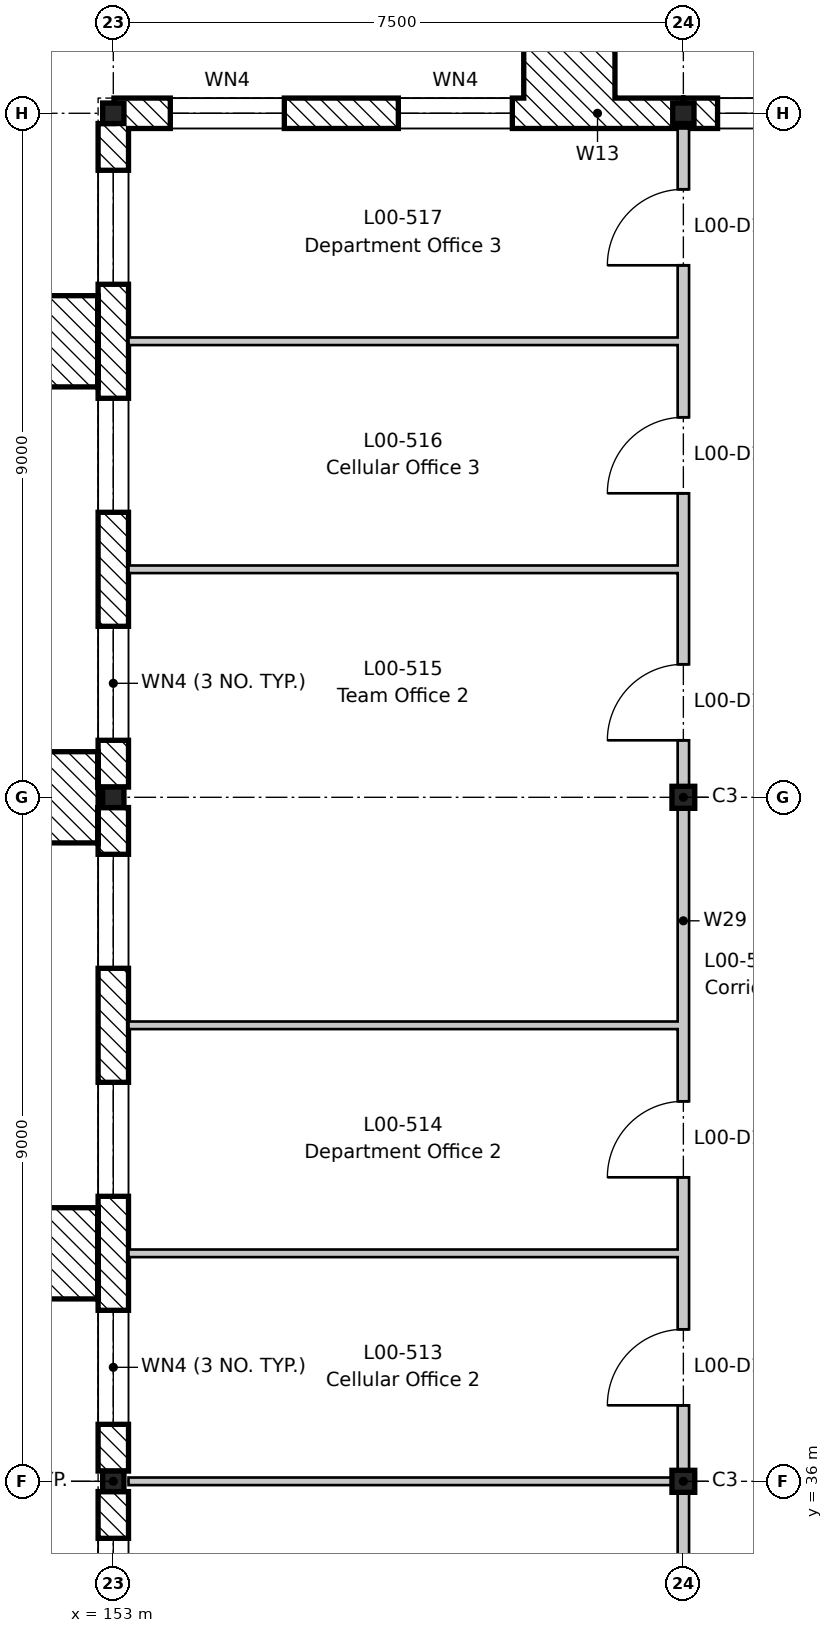
"""IFC4 building model, lengths in metres.
Left out: names, types, materials, properties, quantities, classifications, styles, units other than length and angle.
Written with IfcOpenShell. Run it as: python <this file> out.ifc"""

import sys

from ifc_helpers import new_model, si_unit, direction, frame, frame_2d, origin, origin_2d, place, context, subcontext, project, spatial, rectangle, i_section, extrude, element, fill, save


model = new_model("IFC4")
c1 = context("Model", 3, precision=1e-05, world=origin(), true_north=direction((0.0, 1.0)))
c2 = subcontext(c1, "Body", "Model", "MODEL_VIEW")
j1 = project(units=[si_unit("LENGTHUNIT", "METRE"), si_unit("PLANEANGLEUNIT", "RADIAN")], contexts=[c1])
p1 = place(None, origin())
s1 = spatial("IfcSite", under=j1, at=p1, CompositionType="ELEMENT")
p2 = place(p1, origin())
s2 = spatial("IfcBuilding", under=s1, at=p2, CompositionType="ELEMENT")
p3 = place(p2, origin())
s3 = spatial("IfcBuildingStorey", under=s2, at=p3, CompositionType="ELEMENT", Elevation=0.0)
for number, where, z_axis, x_axis in (
    (1, (153.0, 36.0, -0.6), (0.0, 0.0, 1.0), (1.0, 0.0, 0.0)),
    (2, (153.0, 45.0, -0.6), (0.0, 0.0, 1.0), (1.0, 0.0, 0.0)),
    (3, (153.0, 54.0, -0.6), (0.0, 0.0, 1.0), (1.0, 0.0, 0.0)),
):
    element("IfcColumn", number, at=place(p3, frame(where, z_axis=z_axis, x_axis=x_axis)), inside=s3, PredefinedType="COLUMN", context=c2, shape_type="SweptSolid", body=[
        extrude(i_section(OverallWidth=0.28, OverallDepth=0.27, WebThickness=0.008, FlangeThickness=0.013, FilletRadius=0.024, at=origin_2d()), origin(), (0.0, 0.0, 1.0), 5.8),
    ])
for number, where, z_axis, x_axis in (
    (4, (160.5, 36.0, -0.6), (0.0, 0.0, 1.0), (1.0, 0.0, 0.0)),
    (5, (160.5, 45.0, -0.6), (0.0, 0.0, 1.0), (1.0, 0.0, 0.0)),
):
    element("IfcColumn", number, at=place(p3, frame(where, z_axis=z_axis, x_axis=x_axis)), inside=s3, PredefinedType="COLUMN", context=c2, shape_type="SweptSolid", body=[
        extrude(i_section(OverallWidth=0.3, OverallDepth=0.29, WebThickness=0.009, FlangeThickness=0.014, FilletRadius=0.027, at=origin_2d()), origin(), (0.0, 0.0, 1.0), 5.8),
    ])
p4 = place(p3, frame((160.5, 54.0, -0.6), z_axis=(0.0, 0.0, 1.0), x_axis=(1.0, 0.0, 0.0)))
e6 = element("IfcColumn", 6, at=p4, inside=s3, PredefinedType="COLUMN", context=c2, shape_type="SweptSolid", body=[
    extrude(i_section(OverallWidth=0.28, OverallDepth=0.27, WebThickness=0.008, FlangeThickness=0.013, FilletRadius=0.024, at=origin_2d()), origin(), (0.0, 0.0, 1.0), 5.8),
])
p5 = place(p3, frame((153.0, 27.135, 0.0), z_axis=(0.0, 0.0, 1.0), x_axis=(0.0, 1.0, 0.0)))
e7 = element("IfcWall", 7, at=p5, inside=s3, PredefinedType="STANDARD", context=c2, shape_type="SweptSolid", body=[
    extrude(rectangle(XDim=8.73, YDim=0.4, at=frame_2d((4.365, 0.0))), origin(), (0.0, 0.0, 1.0), 4.8),
])
p6 = place(p5, frame((0.615, 0.0, 0.3)))
e8 = element("IfcOpeningElement", 8, at=p6, cuts=e7, PredefinedType="OPENING", context=c2, shape_type="SweptSolid", body=[
    extrude(rectangle(XDim=1.5, YDim=3.3, at=frame_2d((0.75, 1.65))), frame((0.0, 0.21, 0.0), z_axis=(0.0, -1.0, 0.0), x_axis=(1.0, 0.0, 0.0)), (0.0, 0.0, 1.0), 0.42),
])
p7 = place(p5, frame((3.615, 0.0, 0.3)))
e9 = element("IfcOpeningElement", 9, at=p7, cuts=e7, PredefinedType="OPENING", context=c2, shape_type="SweptSolid", body=[
    extrude(rectangle(XDim=1.5, YDim=3.3, at=frame_2d((0.75, 1.65))), frame((0.0, 0.21, 0.0), z_axis=(0.0, -1.0, 0.0), x_axis=(1.0, 0.0, 0.0)), (0.0, 0.0, 1.0), 0.42),
])
p8 = place(p5, frame((6.615, 0.0, 0.3)))
e10 = element("IfcOpeningElement", 10, at=p8, cuts=e7, PredefinedType="OPENING", context=c2, shape_type="SweptSolid", body=[
    extrude(rectangle(XDim=1.5, YDim=3.3, at=frame_2d((0.75, 1.65))), frame((0.0, 0.21, 0.0), z_axis=(0.0, -1.0, 0.0), x_axis=(1.0, 0.0, 0.0)), (0.0, 0.0, 1.0), 0.42),
])
p9 = place(p3, frame((153.0, 36.135, 0.0), z_axis=(0.0, 0.0, 1.0), x_axis=(0.0, 1.0, 0.0)))
e11 = element("IfcWall", 11, at=p9, inside=s3, PredefinedType="STANDARD", context=c2, shape_type="SweptSolid", body=[
    extrude(rectangle(XDim=8.73, YDim=0.4, at=frame_2d((4.365, 0.0))), origin(), (0.0, 0.0, 1.0), 4.8),
])
p10 = place(p9, frame((0.615, 0.0, 0.3)))
e12 = element("IfcOpeningElement", 12, at=p10, cuts=e11, PredefinedType="OPENING", context=c2, shape_type="SweptSolid", body=[
    extrude(rectangle(XDim=1.5, YDim=3.3, at=frame_2d((0.75, 1.65))), frame((0.0, 0.21, 0.0), z_axis=(0.0, -1.0, 0.0), x_axis=(1.0, 0.0, 0.0)), (0.0, 0.0, 1.0), 0.42),
])
p11 = place(p9, frame((3.615, 0.0, 0.3)))
e13 = element("IfcOpeningElement", 13, at=p11, cuts=e11, PredefinedType="OPENING", context=c2, shape_type="SweptSolid", body=[
    extrude(rectangle(XDim=1.5, YDim=3.3, at=frame_2d((0.75, 1.65))), frame((0.0, 0.21, 0.0), z_axis=(0.0, -1.0, 0.0), x_axis=(1.0, 0.0, 0.0)), (0.0, 0.0, 1.0), 0.42),
])
p12 = place(p9, frame((6.615, 0.0, 0.3)))
e14 = element("IfcOpeningElement", 14, at=p12, cuts=e11, PredefinedType="OPENING", context=c2, shape_type="SweptSolid", body=[
    extrude(rectangle(XDim=1.5, YDim=3.3, at=frame_2d((0.75, 1.65))), frame((0.0, 0.21, 0.0), z_axis=(0.0, -1.0, 0.0), x_axis=(1.0, 0.0, 0.0)), (0.0, 0.0, 1.0), 0.42),
])
p13 = place(p3, frame((153.0, 45.135, 0.0), z_axis=(0.0, 0.0, 1.0), x_axis=(0.0, 1.0, 0.0)))
e15 = element("IfcWall", 15, at=p13, inside=s3, PredefinedType="STANDARD", context=c2, shape_type="SweptSolid", body=[
    extrude(rectangle(XDim=8.73, YDim=0.4, at=frame_2d((4.365, 0.0))), origin(), (0.0, 0.0, 1.0), 4.8),
])
p14 = place(p13, frame((0.615, 0.0, 0.3)))
e16 = element("IfcOpeningElement", 16, at=p14, cuts=e15, PredefinedType="OPENING", context=c2, shape_type="SweptSolid", body=[
    extrude(rectangle(XDim=1.5, YDim=3.3, at=frame_2d((0.75, 1.65))), frame((0.0, 0.21, 0.0), z_axis=(0.0, -1.0, 0.0), x_axis=(1.0, 0.0, 0.0)), (0.0, 0.0, 1.0), 0.42),
])
p15 = place(p13, frame((3.615, 0.0, 0.3)))
e17 = element("IfcOpeningElement", 17, at=p15, cuts=e15, PredefinedType="OPENING", context=c2, shape_type="SweptSolid", body=[
    extrude(rectangle(XDim=1.5, YDim=3.3, at=frame_2d((0.75, 1.65))), frame((0.0, 0.21, 0.0), z_axis=(0.0, -1.0, 0.0), x_axis=(1.0, 0.0, 0.0)), (0.0, 0.0, 1.0), 0.42),
])
p16 = place(p13, frame((6.615, 0.0, 0.3)))
e18 = element("IfcOpeningElement", 18, at=p16, cuts=e15, PredefinedType="OPENING", context=c2, shape_type="SweptSolid", body=[
    extrude(rectangle(XDim=1.5, YDim=3.3, at=frame_2d((0.75, 1.65))), frame((0.0, 0.21, 0.0), z_axis=(0.0, -1.0, 0.0), x_axis=(1.0, 0.0, 0.0)), (0.0, 0.0, 1.0), 0.42),
])
p17 = place(p3, frame((153.009, 54.0, 0.0), z_axis=(0.0, 0.0, 1.0), x_axis=(1.0, 0.0, 0.0)))
e19 = element("IfcWall", 19, at=p17, inside=s3, PredefinedType="STANDARD", context=c2, shape_type="SweptSolid", body=[
    extrude(rectangle(XDim=7.482, YDim=0.4, at=frame_2d((3.741, 0.0))), origin(), (0.0, 0.0, 1.0), 4.87),
])
p18 = place(p17, frame((0.741, 0.0, 0.3)))
e20 = element("IfcOpeningElement", 20, at=p18, cuts=e19, PredefinedType="OPENING", context=c2, shape_type="SweptSolid", body=[
    extrude(rectangle(XDim=1.5, YDim=3.3, at=frame_2d((0.75, 1.65))), frame((0.0, 0.21, 0.0), z_axis=(0.0, -1.0, 0.0), x_axis=(1.0, 0.0, 0.0)), (0.0, 0.0, 1.0), 0.42),
])
p19 = place(p17, frame((3.741, 0.0, 0.3)))
e21 = element("IfcOpeningElement", 21, at=p19, cuts=e19, PredefinedType="OPENING", context=c2, shape_type="SweptSolid", body=[
    extrude(rectangle(XDim=1.5, YDim=3.3, at=frame_2d((0.75, 1.65))), frame((0.0, 0.21, 0.0), z_axis=(0.0, -1.0, 0.0), x_axis=(1.0, 0.0, 0.0)), (0.0, 0.0, 1.0), 0.42),
])
p20 = place(p3, frame((160.509, 54.0, 0.0), z_axis=(0.0, 0.0, 1.0), x_axis=(1.0, 0.0, 0.0)))
e22 = element("IfcWall", 22, at=p20, inside=s3, PredefinedType="STANDARD", context=c2, shape_type="SweptSolid", body=[
    extrude(rectangle(XDim=2.982, YDim=0.4, at=frame_2d((1.491, 0.0))), origin(), (0.0, 0.0, 1.0), 5.0),
])
p21 = place(p20, frame((0.441, 0.0, 0.9)))
e23 = element("IfcOpeningElement", 23, at=p21, cuts=e22, PredefinedType="OPENING", context=c2, shape_type="SweptSolid", body=[
    extrude(rectangle(XDim=2.1, YDim=2.1, at=frame_2d((1.05, 1.05))), frame((0.0, 0.21, 0.0), z_axis=(0.0, -1.0, 0.0), x_axis=(1.0, 0.0, 0.0)), (0.0, 0.0, 1.0), 0.42),
])
for number, where, z_axis, x_axis in (
    (24, (152.2, 38.4, 0.0), (0.0, 0.0, 1.0), (0.0, 1.0, 0.0)),
    (25, (152.2, 44.4, 0.0), (0.0, 0.0, 1.0), (0.0, 1.0, 0.0)),
    (26, (152.2, 50.4, 0.0), (0.0, 0.0, 1.0), (0.0, 1.0, 0.0)),
    (27, (158.4, 54.8, 0.0), (0.0, 0.0, 1.0), (1.0, 0.0, 0.0)),
):
    element("IfcWall", number, at=place(p3, frame(where, z_axis=z_axis, x_axis=x_axis)), inside=s3, PredefinedType="STANDARD", context=c2, shape_type="SweptSolid", body=[
        extrude(rectangle(XDim=1.2, YDim=1.2, at=frame_2d((0.6, 0.0))), origin(), (0.0, 0.0, 1.0), 5.4),
    ])
p22 = place(p3, frame((153.2, 36.0, 0.0), z_axis=(0.0, 0.0, 1.0), x_axis=(1.0, 0.0, 0.0)))
e28 = element("IfcWall", 28, at=p22, inside=s3, PredefinedType="PARTITIONING", context=c2, shape_type="SweptSolid", body=[
    extrude(rectangle(XDim=7.225, YDim=0.1, at=frame_2d((3.613, 0.0))), origin(), (0.0, 0.0, 1.0), 4.85),
])
for number, where, z_axis, x_axis in (
    (29, (153.2, 39.0, 0.0), (0.0, 0.0, 1.0), (1.0, 0.0, 0.0)),
    (30, (153.2, 42.0, 0.0), (0.0, 0.0, 1.0), (1.0, 0.0, 0.0)),
    (31, (153.2, 48.0, 0.0), (0.0, 0.0, 1.0), (1.0, 0.0, 0.0)),
    (32, (153.2, 51.0, 0.0), (0.0, 0.0, 1.0), (1.0, 0.0, 0.0)),
):
    element("IfcWall", number, at=place(p3, frame(where, z_axis=z_axis, x_axis=x_axis)), inside=s3, PredefinedType="PARTITIONING", context=c2, shape_type="SweptSolid", body=[
        extrude(rectangle(XDim=7.225, YDim=0.1, at=frame_2d((3.613, 0.0))), origin(), (0.0, 0.0, 1.0), 5.2),
    ])
p23 = place(p3, frame((160.5, 0.0, 0.0), z_axis=(0.0, 0.0, 1.0), x_axis=(0.0, 1.0, 0.0)))
e33 = element("IfcWall", 33, at=p23, inside=s3, PredefinedType="PARTITIONING", context=c2, shape_type="SweptSolid", body=[
    extrude(rectangle(XDim=53.8, YDim=0.15, at=frame_2d((26.9, 0.0))), origin(), (0.0, 0.0, 1.0), 4.68),
])
p24 = place(p23, frame((2.5, 0.0, 0.0)))
e34 = element("IfcOpeningElement", 34, at=p24, cuts=e33, PredefinedType="OPENING", context=c2, shape_type="SweptSolid", body=[
    extrude(rectangle(XDim=1.0, YDim=2.1, at=frame_2d((0.5, 1.05))), frame((0.0, 0.085, 0.0), z_axis=(0.0, -1.0, 0.0), x_axis=(1.0, 0.0, 0.0)), (0.0, 0.0, 1.0), 0.17),
])
p25 = place(p23, frame((9.75, 0.0, 0.0)))
e35 = element("IfcOpeningElement", 35, at=p25, cuts=e33, PredefinedType="OPENING", context=c2, shape_type="SweptSolid", body=[
    extrude(rectangle(XDim=1.0, YDim=2.1, at=frame_2d((0.5, 1.05))), frame((0.0, 0.085, 0.0), z_axis=(0.0, -1.0, 0.0), x_axis=(1.0, 0.0, 0.0)), (0.0, 0.0, 1.0), 0.17),
])
p26 = place(p23, frame((14.5, 0.0, 0.0)))
e36 = element("IfcOpeningElement", 36, at=p26, cuts=e33, PredefinedType="OPENING", context=c2, shape_type="SweptSolid", body=[
    extrude(rectangle(XDim=1.0, YDim=2.1, at=frame_2d((0.5, 1.05))), frame((0.0, 0.085, 0.0), z_axis=(0.0, -1.0, 0.0), x_axis=(1.0, 0.0, 0.0)), (0.0, 0.0, 1.0), 0.17),
])
p27 = place(p23, frame((19.0, 0.0, 0.0)))
e37 = element("IfcOpeningElement", 37, at=p27, cuts=e33, PredefinedType="OPENING", context=c2, shape_type="SweptSolid", body=[
    extrude(rectangle(XDim=1.0, YDim=2.1, at=frame_2d((0.5, 1.05))), frame((0.0, 0.085, 0.0), z_axis=(0.0, -1.0, 0.0), x_axis=(1.0, 0.0, 0.0)), (0.0, 0.0, 1.0), 0.17),
])
p28 = place(p23, frame((24.8, 0.0, 0.0)))
e38 = element("IfcOpeningElement", 38, at=p28, cuts=e33, PredefinedType="OPENING", context=c2, shape_type="SweptSolid", body=[
    extrude(rectangle(XDim=1.4, YDim=2.1, at=frame_2d((0.7, 1.05))), frame((0.0, 0.085, 0.0), z_axis=(0.0, -1.0, 0.0), x_axis=(1.0, 0.0, 0.0)), (0.0, 0.0, 1.0), 0.17),
])
p29 = place(p23, frame((32.5, 0.0, 0.0)))
e39 = element("IfcOpeningElement", 39, at=p29, cuts=e33, PredefinedType="OPENING", context=c2, shape_type="SweptSolid", body=[
    extrude(rectangle(XDim=1.0, YDim=2.1, at=frame_2d((0.5, 1.05))), frame((0.0, 0.085, 0.0), z_axis=(0.0, -1.0, 0.0), x_axis=(1.0, 0.0, 0.0)), (0.0, 0.0, 1.0), 0.17),
])
p30 = place(p23, frame((37.0, 0.0, 0.0)))
e40 = element("IfcOpeningElement", 40, at=p30, cuts=e33, PredefinedType="OPENING", context=c2, shape_type="SweptSolid", body=[
    extrude(rectangle(XDim=1.0, YDim=2.1, at=frame_2d((0.5, 1.05))), frame((0.0, 0.085, 0.0), z_axis=(0.0, -1.0, 0.0), x_axis=(1.0, 0.0, 0.0)), (0.0, 0.0, 1.0), 0.17),
])
p31 = place(p23, frame((40.0, 0.0, 0.0)))
e41 = element("IfcOpeningElement", 41, at=p31, cuts=e33, PredefinedType="OPENING", context=c2, shape_type="SweptSolid", body=[
    extrude(rectangle(XDim=1.0, YDim=2.1, at=frame_2d((0.5, 1.05))), frame((0.0, 0.085, 0.0), z_axis=(0.0, -1.0, 0.0), x_axis=(1.0, 0.0, 0.0)), (0.0, 0.0, 1.0), 0.17),
])
p32 = place(p23, frame((45.75, 0.0, 0.0)))
e42 = element("IfcOpeningElement", 42, at=p32, cuts=e33, PredefinedType="OPENING", context=c2, shape_type="SweptSolid", body=[
    extrude(rectangle(XDim=1.0, YDim=2.1, at=frame_2d((0.5, 1.05))), frame((0.0, 0.085, 0.0), z_axis=(0.0, -1.0, 0.0), x_axis=(1.0, 0.0, 0.0)), (0.0, 0.0, 1.0), 0.17),
])
p33 = place(p23, frame((49.0, 0.0, 0.0)))
e43 = element("IfcOpeningElement", 43, at=p33, cuts=e33, PredefinedType="OPENING", context=c2, shape_type="SweptSolid", body=[
    extrude(rectangle(XDim=1.0, YDim=2.1, at=frame_2d((0.5, 1.05))), frame((0.0, 0.085, 0.0), z_axis=(0.0, -1.0, 0.0), x_axis=(1.0, 0.0, 0.0)), (0.0, 0.0, 1.0), 0.17),
])
p34 = place(p23, frame((52.0, 0.0, 0.0)))
e44 = element("IfcOpeningElement", 44, at=p34, cuts=e33, PredefinedType="OPENING", context=c2, shape_type="SweptSolid", body=[
    extrude(rectangle(XDim=1.0, YDim=2.1, at=frame_2d((0.5, 1.05))), frame((0.0, 0.085, 0.0), z_axis=(0.0, -1.0, 0.0), x_axis=(1.0, 0.0, 0.0)), (0.0, 0.0, 1.0), 0.17),
])
p35 = place(p8, origin())
e45 = element("IfcWindow", 45, at=p35, inside=s3, PartitioningType="SINGLE_PANEL", PredefinedType="WINDOW", context=c2, shape_type="SweptSolid", body=[
    extrude(rectangle(XDim=1.5, YDim=3.3, at=frame_2d((0.75, 1.65))), frame((0.0, -0.12, 0.0), z_axis=(0.0, -1.0, 0.0), x_axis=(1.0, 0.0, 0.0)), (0.0, 0.0, 1.0), 0.06),
])
fill(e10, e45)
p36 = place(p10, origin())
e46 = element("IfcWindow", 46, at=p36, inside=s3, PartitioningType="SINGLE_PANEL", PredefinedType="WINDOW", context=c2, shape_type="SweptSolid", body=[
    extrude(rectangle(XDim=1.5, YDim=3.3, at=frame_2d((0.75, 1.65))), frame((0.0, -0.12, 0.0), z_axis=(0.0, -1.0, 0.0), x_axis=(1.0, 0.0, 0.0)), (0.0, 0.0, 1.0), 0.06),
])
fill(e12, e46)
p37 = place(p11, origin())
e47 = element("IfcWindow", 47, at=p37, inside=s3, PartitioningType="SINGLE_PANEL", PredefinedType="WINDOW", context=c2, shape_type="SweptSolid", body=[
    extrude(rectangle(XDim=1.5, YDim=3.3, at=frame_2d((0.75, 1.65))), frame((0.0, -0.12, 0.0), z_axis=(0.0, -1.0, 0.0), x_axis=(1.0, 0.0, 0.0)), (0.0, 0.0, 1.0), 0.06),
])
fill(e13, e47)
p38 = place(p12, origin())
e48 = element("IfcWindow", 48, at=p38, inside=s3, PartitioningType="SINGLE_PANEL", PredefinedType="WINDOW", context=c2, shape_type="SweptSolid", body=[
    extrude(rectangle(XDim=1.5, YDim=3.3, at=frame_2d((0.75, 1.65))), frame((0.0, -0.12, 0.0), z_axis=(0.0, -1.0, 0.0), x_axis=(1.0, 0.0, 0.0)), (0.0, 0.0, 1.0), 0.06),
])
fill(e14, e48)
p39 = place(p14, origin())
e49 = element("IfcWindow", 49, at=p39, inside=s3, PartitioningType="SINGLE_PANEL", PredefinedType="WINDOW", context=c2, shape_type="SweptSolid", body=[
    extrude(rectangle(XDim=1.5, YDim=3.3, at=frame_2d((0.75, 1.65))), frame((0.0, -0.12, 0.0), z_axis=(0.0, -1.0, 0.0), x_axis=(1.0, 0.0, 0.0)), (0.0, 0.0, 1.0), 0.06),
])
fill(e16, e49)
p40 = place(p15, origin())
e50 = element("IfcWindow", 50, at=p40, inside=s3, PartitioningType="SINGLE_PANEL", PredefinedType="WINDOW", context=c2, shape_type="SweptSolid", body=[
    extrude(rectangle(XDim=1.5, YDim=3.3, at=frame_2d((0.75, 1.65))), frame((0.0, -0.12, 0.0), z_axis=(0.0, -1.0, 0.0), x_axis=(1.0, 0.0, 0.0)), (0.0, 0.0, 1.0), 0.06),
])
fill(e17, e50)
p41 = place(p16, origin())
e51 = element("IfcWindow", 51, at=p41, inside=s3, PartitioningType="SINGLE_PANEL", PredefinedType="WINDOW", context=c2, shape_type="SweptSolid", body=[
    extrude(rectangle(XDim=1.5, YDim=3.3, at=frame_2d((0.75, 1.65))), frame((0.0, -0.12, 0.0), z_axis=(0.0, -1.0, 0.0), x_axis=(1.0, 0.0, 0.0)), (0.0, 0.0, 1.0), 0.06),
])
fill(e18, e51)
p42 = place(p18, origin())
e52 = element("IfcWindow", 52, at=p42, inside=s3, PartitioningType="SINGLE_PANEL", PredefinedType="WINDOW", context=c2, shape_type="SweptSolid", body=[
    extrude(rectangle(XDim=1.5, YDim=3.3, at=frame_2d((0.75, 1.65))), frame((0.0, -0.12, 0.0), z_axis=(0.0, -1.0, 0.0), x_axis=(1.0, 0.0, 0.0)), (0.0, 0.0, 1.0), 0.06),
])
fill(e20, e52)
p43 = place(p19, origin())
e53 = element("IfcWindow", 53, at=p43, inside=s3, PartitioningType="SINGLE_PANEL", PredefinedType="WINDOW", context=c2, shape_type="SweptSolid", body=[
    extrude(rectangle(XDim=1.5, YDim=3.3, at=frame_2d((0.75, 1.65))), frame((0.0, -0.12, 0.0), z_axis=(0.0, -1.0, 0.0), x_axis=(1.0, 0.0, 0.0)), (0.0, 0.0, 1.0), 0.06),
])
fill(e21, e53)
p44 = place(p21, origin())
e54 = element("IfcWindow", 54, at=p44, inside=s3, PartitioningType="SINGLE_PANEL", PredefinedType="WINDOW", context=c2, shape_type="SweptSolid", body=[
    extrude(rectangle(XDim=2.1, YDim=2.1, at=frame_2d((1.05, 1.05))), frame((0.0, -0.12, 0.0), z_axis=(0.0, -1.0, 0.0), x_axis=(1.0, 0.0, 0.0)), (0.0, 0.0, 1.0), 0.06),
])
fill(e23, e54)
p45 = place(p30, origin())
e55 = element("IfcDoor", 55, at=p45, inside=s3, OperationType="SINGLE_SWING_LEFT", PredefinedType="DOOR", context=c2, shape_type="SweptSolid", body=[
    extrude(rectangle(XDim=1.0, YDim=2.1, at=frame_2d((0.5, 1.05))), frame((0.0, 0.025, 0.0), z_axis=(0.0, -1.0, 0.0), x_axis=(1.0, 0.0, 0.0)), (0.0, 0.0, 1.0), 0.05),
])
fill(e40, e55)
p46 = place(p31, origin())
e56 = element("IfcDoor", 56, at=p46, inside=s3, OperationType="SINGLE_SWING_LEFT", PredefinedType="DOOR", context=c2, shape_type="SweptSolid", body=[
    extrude(rectangle(XDim=1.0, YDim=2.1, at=frame_2d((0.5, 1.05))), frame((0.0, 0.025, 0.0), z_axis=(0.0, -1.0, 0.0), x_axis=(1.0, 0.0, 0.0)), (0.0, 0.0, 1.0), 0.05),
])
fill(e41, e56)
p47 = place(p32, origin())
e57 = element("IfcDoor", 57, at=p47, inside=s3, OperationType="SINGLE_SWING_LEFT", PredefinedType="DOOR", context=c2, shape_type="SweptSolid", body=[
    extrude(rectangle(XDim=1.0, YDim=2.1, at=frame_2d((0.5, 1.05))), frame((0.0, 0.025, 0.0), z_axis=(0.0, -1.0, 0.0), x_axis=(1.0, 0.0, 0.0)), (0.0, 0.0, 1.0), 0.05),
])
fill(e42, e57)
p48 = place(p33, origin())
e58 = element("IfcDoor", 58, at=p48, inside=s3, OperationType="SINGLE_SWING_LEFT", PredefinedType="DOOR", context=c2, shape_type="SweptSolid", body=[
    extrude(rectangle(XDim=1.0, YDim=2.1, at=frame_2d((0.5, 1.05))), frame((0.0, 0.025, 0.0), z_axis=(0.0, -1.0, 0.0), x_axis=(1.0, 0.0, 0.0)), (0.0, 0.0, 1.0), 0.05),
])
fill(e43, e58)
p49 = place(p34, origin())
e59 = element("IfcDoor", 59, at=p49, inside=s3, OperationType="SINGLE_SWING_LEFT", PredefinedType="DOOR", context=c2, shape_type="SweptSolid", body=[
    extrude(rectangle(XDim=1.0, YDim=2.1, at=frame_2d((0.5, 1.05))), frame((0.0, 0.025, 0.0), z_axis=(0.0, -1.0, 0.0), x_axis=(1.0, 0.0, 0.0)), (0.0, 0.0, 1.0), 0.05),
])
fill(e44, e59)
save(model, sys.argv[1])
